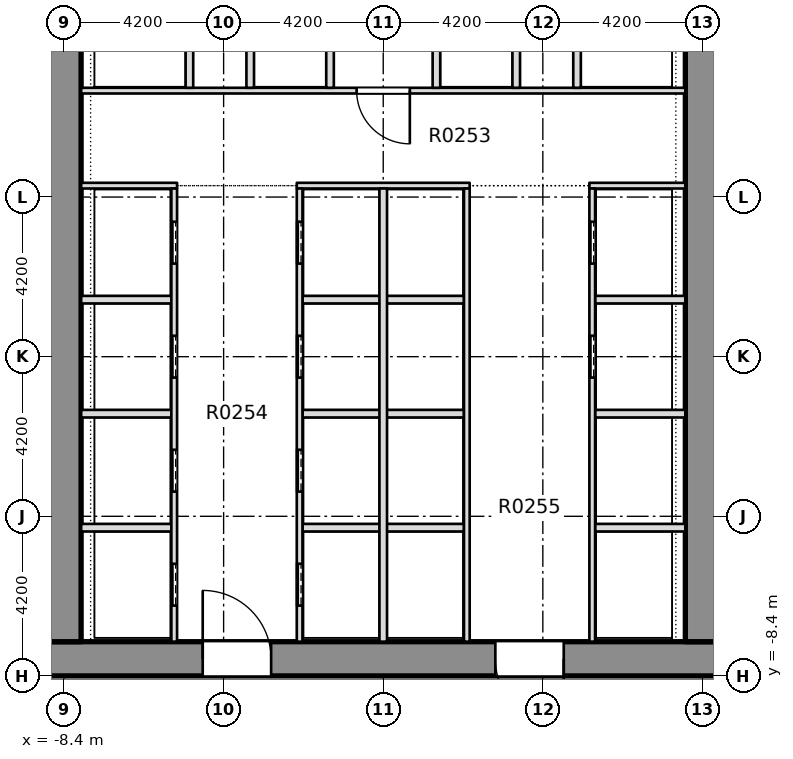
"""IFC4 building model, lengths in metres.
Left out: names, types, materials, properties, quantities, classifications, styles, units other than length and angle.
Written with IfcOpenShell. Run it as: python <this file> out.ifc"""

import sys

from ifc_helpers import new_model, si_unit, direction, frame, frame_2d, origin, place, context, subcontext, project, spatial, rectangle, extrude, element, fill, save


model = new_model("IFC4")
c1 = context("Model", 3, precision=1e-05, world=origin(), true_north=direction((0.0, 1.0)))
c2 = subcontext(c1, "Body", "Model", "MODEL_VIEW")
j1 = project(units=[si_unit("LENGTHUNIT", "METRE"), si_unit("PLANEANGLEUNIT", "RADIAN")], contexts=[c1])
p1 = place(None, origin())
s1 = spatial("IfcSite", under=j1, at=p1, CompositionType="ELEMENT")
p2 = place(p1, origin())
s2 = spatial("IfcBuilding", under=s1, at=p2, CompositionType="ELEMENT")
p3 = place(p2, frame((0.0, 0.0, 12.5)))
s3 = spatial("IfcBuildingStorey", under=s2, at=p3, CompositionType="ELEMENT", Elevation=12.5)
p4 = place(p3, frame((-11.7, -7.95, -0.4), z_axis=(0.0, 0.0, 1.0), x_axis=(1.0, 0.0, 0.0)))
e1 = element("IfcWall", 1, at=p4, inside=s3, PredefinedType="SHEAR", context=c2, shape_type="SweptSolid", body=[
    extrude(rectangle(XDim=23.4, YDim=0.9, at=frame_2d((11.7, 0.0))), origin(), (0.0, 0.0, 1.0), 7.5),
])
p5 = place(p4, frame((6.95, 0.0, 0.4)))
e2 = element("IfcOpeningElement", 2, at=p5, cuts=e1, PredefinedType="OPENING", context=c2, shape_type="SweptSolid", body=[
    extrude(rectangle(XDim=1.8, YDim=2.1, at=frame_2d((0.9, 1.05))), frame((0.0, 0.46, 0.0), z_axis=(0.0, -1.0, 0.0), x_axis=(1.0, 0.0, 0.0)), (0.0, 0.0, 1.0), 0.92),
])
p6 = place(p4, frame((14.65, 0.0, 0.4)))
e3 = element("IfcOpeningElement", 3, at=p6, cuts=e1, PredefinedType="OPENING", context=c2, shape_type="SweptSolid", body=[
    extrude(rectangle(XDim=1.8, YDim=2.1, at=frame_2d((0.9, 1.05))), frame((0.0, 0.46, 0.0), z_axis=(0.0, -1.0, 0.0), x_axis=(1.0, 0.0, 0.0)), (0.0, 0.0, 1.0), 0.92),
])
p7 = place(p3, frame((-8.4, -7.5, -0.4), z_axis=(0.0, 0.0, 1.0), x_axis=(0.0, 1.0, 0.0)))
e4 = element("IfcWall", 4, at=p7, inside=s3, PredefinedType="SHEAR", context=c2, shape_type="SweptSolid", body=[
    extrude(rectangle(XDim=28.35, YDim=0.9, at=frame_2d((14.175, 0.0))), origin(), (0.0, 0.0, 1.0), 7.5),
])
p8 = place(p7, frame((18.4, 0.0, 0.4)))
e5 = element("IfcOpeningElement", 5, at=p8, cuts=e4, PredefinedType="OPENING", context=c2, shape_type="SweptSolid", body=[
    extrude(rectangle(XDim=1.2, YDim=2.1, at=frame_2d((0.6, 1.05))), frame((0.0, 0.46, 0.0), z_axis=(0.0, -1.0, 0.0), x_axis=(1.0, 0.0, 0.0)), (0.0, 0.0, 1.0), 0.92),
])
p9 = place(p3, frame((8.4, -7.5, -0.4), z_axis=(0.0, 0.0, 1.0), x_axis=(0.0, 1.0, 0.0)))
e6 = element("IfcWall", 6, at=p9, inside=s3, PredefinedType="SHEAR", context=c2, shape_type="SweptSolid", body=[
    extrude(rectangle(XDim=28.35, YDim=0.9, at=frame_2d((14.175, 0.0))), origin(), (0.0, 0.0, 1.0), 7.5),
])
p10 = place(p9, frame((18.4, 0.0, 0.4)))
e7 = element("IfcOpeningElement", 7, at=p10, cuts=e6, PredefinedType="OPENING", context=c2, shape_type="SweptSolid", body=[
    extrude(rectangle(XDim=1.2, YDim=2.1, at=frame_2d((0.6, 1.05))), frame((0.0, 0.46, 0.0), z_axis=(0.0, -1.0, 0.0), x_axis=(1.0, 0.0, 0.0)), (0.0, 0.0, 1.0), 0.92),
])
p11 = place(p3, frame((-7.949, -4.5, 0.0), z_axis=(0.0, 0.0, 1.0), x_axis=(1.0, 0.0, 0.0)))
e8 = element("IfcWall", 8, at=p11, inside=s3, PredefinedType="PARTITIONING", context=c2, shape_type="SweptSolid", body=[
    extrude(rectangle(XDim=2.374, YDim=0.2, at=frame_2d((1.187, 0.0))), origin(), (0.0, 0.0, 1.0), 7.1),
])
p12 = place(p3, frame((-2.125, -4.5, 0.0), z_axis=(0.0, 0.0, 1.0), x_axis=(1.0, 0.0, 0.0)))
e9 = element("IfcWall", 9, at=p12, inside=s3, PredefinedType="PARTITIONING", context=c2, shape_type="SweptSolid", body=[
    extrude(rectangle(XDim=4.25, YDim=0.2, at=frame_2d((2.125, 0.0))), origin(), (0.0, 0.0, 1.0), 7.1),
])
for number, where, z_axis, x_axis in (
    (10, (5.575, -4.5, 0.0), (0.0, 0.0, 1.0), (1.0, 0.0, 0.0)),
    (11, (-7.949, -1.5, 0.0), (0.0, 0.0, 1.0), (1.0, 0.0, 0.0)),
):
    element("IfcWall", number, at=place(p3, frame(where, z_axis=z_axis, x_axis=x_axis)), inside=s3, PredefinedType="PARTITIONING", context=c2, shape_type="SweptSolid", body=[
        extrude(rectangle(XDim=2.374, YDim=0.2, at=frame_2d((1.187, 0.0))), origin(), (0.0, 0.0, 1.0), 7.1),
    ])
p13 = place(p3, frame((-2.125, -1.5, 0.0), z_axis=(0.0, 0.0, 1.0), x_axis=(1.0, 0.0, 0.0)))
e12 = element("IfcWall", 12, at=p13, inside=s3, PredefinedType="PARTITIONING", context=c2, shape_type="SweptSolid", body=[
    extrude(rectangle(XDim=4.25, YDim=0.2, at=frame_2d((2.125, 0.0))), origin(), (0.0, 0.0, 1.0), 7.1),
])
for number, where, z_axis, x_axis in (
    (13, (5.575, -1.5, 0.0), (0.0, 0.0, 1.0), (1.0, 0.0, 0.0)),
    (14, (-7.949, 1.5, 0.0), (0.0, 0.0, 1.0), (1.0, 0.0, 0.0)),
):
    element("IfcWall", number, at=place(p3, frame(where, z_axis=z_axis, x_axis=x_axis)), inside=s3, PredefinedType="PARTITIONING", context=c2, shape_type="SweptSolid", body=[
        extrude(rectangle(XDim=2.374, YDim=0.2, at=frame_2d((1.187, 0.0))), origin(), (0.0, 0.0, 1.0), 7.1),
    ])
p14 = place(p3, frame((-2.125, 1.5, 0.0), z_axis=(0.0, 0.0, 1.0), x_axis=(1.0, 0.0, 0.0)))
e15 = element("IfcWall", 15, at=p14, inside=s3, PredefinedType="PARTITIONING", context=c2, shape_type="SweptSolid", body=[
    extrude(rectangle(XDim=4.25, YDim=0.2, at=frame_2d((2.125, 0.0))), origin(), (0.0, 0.0, 1.0), 7.1),
])
p15 = place(p3, frame((5.575, 1.5, 0.0), z_axis=(0.0, 0.0, 1.0), x_axis=(1.0, 0.0, 0.0)))
e16 = element("IfcWall", 16, at=p15, inside=s3, PredefinedType="PARTITIONING", context=c2, shape_type="SweptSolid", body=[
    extrude(rectangle(XDim=2.374, YDim=0.2, at=frame_2d((1.187, 0.0))), origin(), (0.0, 0.0, 1.0), 7.1),
])
p16 = place(p3, frame((-7.949, 4.5, 0.0), z_axis=(0.0, 0.0, 1.0), x_axis=(1.0, 0.0, 0.0)))
e17 = element("IfcWall", 17, at=p16, inside=s3, PredefinedType="PARTITIONING", context=c2, shape_type="SweptSolid", body=[
    extrude(rectangle(XDim=2.524, YDim=0.15, at=frame_2d((1.262, 0.0))), origin(), (0.0, 0.0, 1.0), 7.1),
])
p17 = place(p3, frame((-2.275, 4.5, 0.0), z_axis=(0.0, 0.0, 1.0), x_axis=(1.0, 0.0, 0.0)))
e18 = element("IfcWall", 18, at=p17, inside=s3, PredefinedType="PARTITIONING", context=c2, shape_type="SweptSolid", body=[
    extrude(rectangle(XDim=4.55, YDim=0.15, at=frame_2d((2.275, 0.0))), origin(), (0.0, 0.0, 1.0), 7.1),
])
p18 = place(p3, frame((5.425, 4.5, 0.0), z_axis=(0.0, 0.0, 1.0), x_axis=(1.0, 0.0, 0.0)))
e19 = element("IfcWall", 19, at=p18, inside=s3, PredefinedType="PARTITIONING", context=c2, shape_type="SweptSolid", body=[
    extrude(rectangle(XDim=2.524, YDim=0.15, at=frame_2d((1.262, 0.0))), origin(), (0.0, 0.0, 1.0), 7.1),
])
p19 = place(p3, frame((-7.949, 7.0, 0.0), z_axis=(0.0, 0.0, 1.0), x_axis=(1.0, 0.0, 0.0)))
e20 = element("IfcWall", 20, at=p19, inside=s3, PredefinedType="PARTITIONING", context=c2, shape_type="SweptSolid", body=[
    extrude(rectangle(XDim=15.898, YDim=0.15, at=frame_2d((7.949, 0.0))), origin(), (0.0, 0.0, 1.0), 7.1),
])
p20 = place(p19, frame((7.249, 0.0, 0.0)))
e21 = element("IfcOpeningElement", 21, at=p20, cuts=e20, PredefinedType="OPENING", context=c2, shape_type="SweptSolid", body=[
    extrude(rectangle(XDim=1.4, YDim=2.1, at=frame_2d((0.7, 1.05))), frame((0.0, 0.085, 0.0), z_axis=(0.0, -1.0, 0.0), x_axis=(1.0, 0.0, 0.0)), (0.0, 0.0, 1.0), 0.17),
])
p21 = place(p3, frame((-5.5, -7.499, 0.0), z_axis=(0.0, 0.0, 1.0), x_axis=(0.0, 1.0, 0.0)))
e22 = element("IfcWall", 22, at=p21, inside=s3, PredefinedType="PARTITIONING", context=c2, shape_type="SweptSolid", body=[
    extrude(rectangle(XDim=11.924, YDim=0.15, at=frame_2d((5.962, 0.0))), origin(), (0.0, 0.0, 1.0), 7.1),
])
p22 = place(p21, frame((0.949, 0.0, 0.0)))
e23 = element("IfcOpeningElement", 23, at=p22, cuts=e22, PredefinedType="OPENING", context=c2, shape_type="SweptSolid", body=[
    extrude(rectangle(XDim=1.1, YDim=2.1, at=frame_2d((0.55, 1.05))), frame((0.0, 0.085, 0.0), z_axis=(0.0, -1.0, 0.0), x_axis=(1.0, 0.0, 0.0)), (0.0, 0.0, 1.0), 0.17),
])
p23 = place(p21, frame((3.949, 0.0, 0.0)))
e24 = element("IfcOpeningElement", 24, at=p23, cuts=e22, PredefinedType="OPENING", context=c2, shape_type="SweptSolid", body=[
    extrude(rectangle(XDim=1.1, YDim=2.1, at=frame_2d((0.55, 1.05))), frame((0.0, 0.085, 0.0), z_axis=(0.0, -1.0, 0.0), x_axis=(1.0, 0.0, 0.0)), (0.0, 0.0, 1.0), 0.17),
])
p24 = place(p21, frame((6.949, 0.0, 0.0)))
e25 = element("IfcOpeningElement", 25, at=p24, cuts=e22, PredefinedType="OPENING", context=c2, shape_type="SweptSolid", body=[
    extrude(rectangle(XDim=1.1, YDim=2.1, at=frame_2d((0.55, 1.05))), frame((0.0, 0.085, 0.0), z_axis=(0.0, -1.0, 0.0), x_axis=(1.0, 0.0, 0.0)), (0.0, 0.0, 1.0), 0.17),
])
p25 = place(p21, frame((9.949, 0.0, 0.0)))
e26 = element("IfcOpeningElement", 26, at=p25, cuts=e22, PredefinedType="OPENING", context=c2, shape_type="SweptSolid", body=[
    extrude(rectangle(XDim=1.1, YDim=2.1, at=frame_2d((0.55, 1.05))), frame((0.0, 0.085, 0.0), z_axis=(0.0, -1.0, 0.0), x_axis=(1.0, 0.0, 0.0)), (0.0, 0.0, 1.0), 0.17),
])
p26 = place(p3, frame((-5.1, 7.075, 0.0), z_axis=(0.0, 0.0, 1.0), x_axis=(0.0, 1.0, 0.0)))
e27 = element("IfcWall", 27, at=p26, inside=s3, PredefinedType="PARTITIONING", context=c2, shape_type="SweptSolid", body=[
    extrude(rectangle(XDim=2.725, YDim=0.2, at=frame_2d((1.363, 0.0))), origin(), (0.0, 0.0, 1.0), 7.1),
])
p27 = place(p3, frame((-3.5, 7.075, 0.0), z_axis=(0.0, 0.0, 1.0), x_axis=(0.0, 1.0, 0.0)))
e28 = element("IfcWall", 28, at=p27, inside=s3, PredefinedType="PARTITIONING", context=c2, shape_type="SweptSolid", body=[
    extrude(rectangle(XDim=2.85, YDim=0.2, at=frame_2d((1.425, 0.0))), origin(), (0.0, 0.0, 1.0), 7.1),
])
p28 = place(p3, frame((-2.2, -7.499, 0.0), z_axis=(0.0, 0.0, 1.0), x_axis=(0.0, 1.0, 0.0)))
e29 = element("IfcWall", 29, at=p28, inside=s3, PredefinedType="PARTITIONING", context=c2, shape_type="SweptSolid", body=[
    extrude(rectangle(XDim=11.924, YDim=0.15, at=frame_2d((5.962, 0.0))), origin(), (0.0, 0.0, 1.0), 7.1),
])
p29 = place(p28, frame((0.949, 0.0, 0.0)))
e30 = element("IfcOpeningElement", 30, at=p29, cuts=e29, PredefinedType="OPENING", context=c2, shape_type="SweptSolid", body=[
    extrude(rectangle(XDim=1.1, YDim=2.1, at=frame_2d((0.55, 1.05))), frame((0.0, 0.085, 0.0), z_axis=(0.0, -1.0, 0.0), x_axis=(1.0, 0.0, 0.0)), (0.0, 0.0, 1.0), 0.17),
])
p30 = place(p28, frame((3.949, 0.0, 0.0)))
e31 = element("IfcOpeningElement", 31, at=p30, cuts=e29, PredefinedType="OPENING", context=c2, shape_type="SweptSolid", body=[
    extrude(rectangle(XDim=1.1, YDim=2.1, at=frame_2d((0.55, 1.05))), frame((0.0, 0.085, 0.0), z_axis=(0.0, -1.0, 0.0), x_axis=(1.0, 0.0, 0.0)), (0.0, 0.0, 1.0), 0.17),
])
p31 = place(p28, frame((6.949, 0.0, 0.0)))
e32 = element("IfcOpeningElement", 32, at=p31, cuts=e29, PredefinedType="OPENING", context=c2, shape_type="SweptSolid", body=[
    extrude(rectangle(XDim=1.1, YDim=2.1, at=frame_2d((0.55, 1.05))), frame((0.0, 0.085, 0.0), z_axis=(0.0, -1.0, 0.0), x_axis=(1.0, 0.0, 0.0)), (0.0, 0.0, 1.0), 0.17),
])
p32 = place(p28, frame((9.949, 0.0, 0.0)))
e33 = element("IfcOpeningElement", 33, at=p32, cuts=e29, PredefinedType="OPENING", context=c2, shape_type="SweptSolid", body=[
    extrude(rectangle(XDim=1.1, YDim=2.1, at=frame_2d((0.55, 1.05))), frame((0.0, 0.085, 0.0), z_axis=(0.0, -1.0, 0.0), x_axis=(1.0, 0.0, 0.0)), (0.0, 0.0, 1.0), 0.17),
])
p33 = place(p3, frame((-1.4, 7.075, 0.0), z_axis=(0.0, 0.0, 1.0), x_axis=(0.0, 1.0, 0.0)))
e34 = element("IfcWall", 34, at=p33, inside=s3, PredefinedType="PARTITIONING", context=c2, shape_type="SweptSolid", body=[
    extrude(rectangle(XDim=2.85, YDim=0.2, at=frame_2d((1.425, 0.0))), origin(), (0.0, 0.0, 1.0), 7.1),
])
p34 = place(p3, frame((0.0, -7.499, 0.0), z_axis=(0.0, 0.0, 1.0), x_axis=(0.0, 1.0, 0.0)))
e35 = element("IfcWall", 35, at=p34, inside=s3, PredefinedType="PARTITIONING", context=c2, shape_type="SweptSolid", body=[
    extrude(rectangle(XDim=11.924, YDim=0.2, at=frame_2d((5.962, 0.0))), origin(), (0.0, 0.0, 1.0), 7.1),
])
p35 = place(p3, frame((1.4, 7.075, 0.0), z_axis=(0.0, 0.0, 1.0), x_axis=(0.0, 1.0, 0.0)))
e36 = element("IfcWall", 36, at=p35, inside=s3, PredefinedType="PARTITIONING", context=c2, shape_type="SweptSolid", body=[
    extrude(rectangle(XDim=2.85, YDim=0.2, at=frame_2d((1.425, 0.0))), origin(), (0.0, 0.0, 1.0), 7.1),
])
p36 = place(p3, frame((2.2, -7.499, 0.0), z_axis=(0.0, 0.0, 1.0), x_axis=(0.0, 1.0, 0.0)))
e37 = element("IfcWall", 37, at=p36, inside=s3, PredefinedType="PARTITIONING", context=c2, shape_type="SweptSolid", body=[
    extrude(rectangle(XDim=11.924, YDim=0.15, at=frame_2d((5.962, 0.0))), origin(), (0.0, 0.0, 1.0), 7.1),
])
p37 = place(p3, frame((3.5, 7.075, 0.0), z_axis=(0.0, 0.0, 1.0), x_axis=(0.0, 1.0, 0.0)))
e38 = element("IfcWall", 38, at=p37, inside=s3, PredefinedType="PARTITIONING", context=c2, shape_type="SweptSolid", body=[
    extrude(rectangle(XDim=2.85, YDim=0.2, at=frame_2d((1.425, 0.0))), origin(), (0.0, 0.0, 1.0), 7.1),
])
p38 = place(p3, frame((5.1, 7.075, 0.0), z_axis=(0.0, 0.0, 1.0), x_axis=(0.0, 1.0, 0.0)))
e39 = element("IfcWall", 39, at=p38, inside=s3, PredefinedType="PARTITIONING", context=c2, shape_type="SweptSolid", body=[
    extrude(rectangle(XDim=2.725, YDim=0.2, at=frame_2d((1.363, 0.0))), origin(), (0.0, 0.0, 1.0), 7.1),
])
p39 = place(p3, frame((5.5, -7.499, 0.0), z_axis=(0.0, 0.0, 1.0), x_axis=(0.0, 1.0, 0.0)))
e40 = element("IfcWall", 40, at=p39, inside=s3, PredefinedType="PARTITIONING", context=c2, shape_type="SweptSolid", body=[
    extrude(rectangle(XDim=11.924, YDim=0.15, at=frame_2d((5.962, 0.0))), origin(), (0.0, 0.0, 1.0), 7.1),
])
p40 = place(p39, frame((6.949, 0.0, 0.0)))
e41 = element("IfcOpeningElement", 41, at=p40, cuts=e40, PredefinedType="OPENING", context=c2, shape_type="SweptSolid", body=[
    extrude(rectangle(XDim=1.1, YDim=2.1, at=frame_2d((0.55, 1.05))), frame((0.0, 0.085, 0.0), z_axis=(0.0, -1.0, 0.0), x_axis=(1.0, 0.0, 0.0)), (0.0, 0.0, 1.0), 0.17),
])
p41 = place(p39, frame((9.949, 0.0, 0.0)))
e42 = element("IfcOpeningElement", 42, at=p41, cuts=e40, PredefinedType="OPENING", context=c2, shape_type="SweptSolid", body=[
    extrude(rectangle(XDim=1.1, YDim=2.1, at=frame_2d((0.55, 1.05))), frame((0.0, 0.085, 0.0), z_axis=(0.0, -1.0, 0.0), x_axis=(1.0, 0.0, 0.0)), (0.0, 0.0, 1.0), 0.17),
])
p42 = place(p22, origin())
e43 = element("IfcDoor", 43, at=p42, inside=s3, OperationType="SLIDING_TO_RIGHT", PredefinedType="DOOR", context=c2, shape_type="SweptSolid", body=[
    extrude(rectangle(XDim=1.1, YDim=2.1, at=frame_2d((0.55, 1.05))), frame((0.0, 0.025, 0.0), z_axis=(0.0, -1.0, 0.0), x_axis=(1.0, 0.0, 0.0)), (0.0, 0.0, 1.0), 0.05),
])
fill(e23, e43)
p43 = place(p23, origin())
e44 = element("IfcDoor", 44, at=p43, inside=s3, OperationType="SLIDING_TO_RIGHT", PredefinedType="DOOR", context=c2, shape_type="SweptSolid", body=[
    extrude(rectangle(XDim=1.1, YDim=2.1, at=frame_2d((0.55, 1.05))), frame((0.0, 0.025, 0.0), z_axis=(0.0, -1.0, 0.0), x_axis=(1.0, 0.0, 0.0)), (0.0, 0.0, 1.0), 0.05),
])
fill(e24, e44)
p44 = place(p24, origin())
e45 = element("IfcDoor", 45, at=p44, inside=s3, OperationType="SLIDING_TO_RIGHT", PredefinedType="DOOR", context=c2, shape_type="SweptSolid", body=[
    extrude(rectangle(XDim=1.1, YDim=2.1, at=frame_2d((0.55, 1.05))), frame((0.0, 0.025, 0.0), z_axis=(0.0, -1.0, 0.0), x_axis=(1.0, 0.0, 0.0)), (0.0, 0.0, 1.0), 0.05),
])
fill(e25, e45)
p45 = place(p25, origin())
e46 = element("IfcDoor", 46, at=p45, inside=s3, OperationType="SLIDING_TO_RIGHT", PredefinedType="DOOR", context=c2, shape_type="SweptSolid", body=[
    extrude(rectangle(XDim=1.1, YDim=2.1, at=frame_2d((0.55, 1.05))), frame((0.0, 0.025, 0.0), z_axis=(0.0, -1.0, 0.0), x_axis=(1.0, 0.0, 0.0)), (0.0, 0.0, 1.0), 0.05),
])
fill(e26, e46)
p46 = place(p29, origin())
e47 = element("IfcDoor", 47, at=p46, inside=s3, OperationType="SLIDING_TO_RIGHT", PredefinedType="DOOR", context=c2, shape_type="SweptSolid", body=[
    extrude(rectangle(XDim=1.1, YDim=2.1, at=frame_2d((0.55, 1.05))), frame((0.0, 0.025, 0.0), z_axis=(0.0, -1.0, 0.0), x_axis=(1.0, 0.0, 0.0)), (0.0, 0.0, 1.0), 0.05),
])
fill(e30, e47)
p47 = place(p30, origin())
e48 = element("IfcDoor", 48, at=p47, inside=s3, OperationType="SLIDING_TO_RIGHT", PredefinedType="DOOR", context=c2, shape_type="SweptSolid", body=[
    extrude(rectangle(XDim=1.1, YDim=2.1, at=frame_2d((0.55, 1.05))), frame((0.0, 0.025, 0.0), z_axis=(0.0, -1.0, 0.0), x_axis=(1.0, 0.0, 0.0)), (0.0, 0.0, 1.0), 0.05),
])
fill(e31, e48)
p48 = place(p31, origin())
e49 = element("IfcDoor", 49, at=p48, inside=s3, OperationType="SLIDING_TO_RIGHT", PredefinedType="DOOR", context=c2, shape_type="SweptSolid", body=[
    extrude(rectangle(XDim=1.1, YDim=2.1, at=frame_2d((0.55, 1.05))), frame((0.0, 0.025, 0.0), z_axis=(0.0, -1.0, 0.0), x_axis=(1.0, 0.0, 0.0)), (0.0, 0.0, 1.0), 0.05),
])
fill(e32, e49)
p49 = place(p32, origin())
e50 = element("IfcDoor", 50, at=p49, inside=s3, OperationType="SLIDING_TO_RIGHT", PredefinedType="DOOR", context=c2, shape_type="SweptSolid", body=[
    extrude(rectangle(XDim=1.1, YDim=2.1, at=frame_2d((0.55, 1.05))), frame((0.0, 0.025, 0.0), z_axis=(0.0, -1.0, 0.0), x_axis=(1.0, 0.0, 0.0)), (0.0, 0.0, 1.0), 0.05),
])
fill(e33, e50)
p50 = place(p40, origin())
e51 = element("IfcDoor", 51, at=p50, inside=s3, OperationType="SLIDING_TO_RIGHT", PredefinedType="DOOR", context=c2, shape_type="SweptSolid", body=[
    extrude(rectangle(XDim=1.1, YDim=2.1, at=frame_2d((0.55, 1.05))), frame((0.0, 0.025, 0.0), z_axis=(0.0, -1.0, 0.0), x_axis=(1.0, 0.0, 0.0)), (0.0, 0.0, 1.0), 0.05),
])
fill(e41, e51)
p51 = place(p41, origin())
e52 = element("IfcDoor", 52, at=p51, inside=s3, OperationType="SLIDING_TO_RIGHT", PredefinedType="DOOR", context=c2, shape_type="SweptSolid", body=[
    extrude(rectangle(XDim=1.1, YDim=2.1, at=frame_2d((0.55, 1.05))), frame((0.0, 0.025, 0.0), z_axis=(0.0, -1.0, 0.0), x_axis=(1.0, 0.0, 0.0)), (0.0, 0.0, 1.0), 0.05),
])
fill(e42, e52)
p52 = place(p20, origin())
e53 = element("IfcDoor", 53, at=p52, inside=s3, OperationType="SINGLE_SWING_RIGHT", PredefinedType="DOOR", context=c2, shape_type="SweptSolid", body=[
    extrude(rectangle(XDim=1.4, YDim=2.1, at=frame_2d((0.7, 1.05))), frame((0.0, 0.025, 0.0), z_axis=(0.0, -1.0, 0.0), x_axis=(1.0, 0.0, 0.0)), (0.0, 0.0, 1.0), 0.05),
])
fill(e21, e53)
p53 = place(p5, origin())
e54 = element("IfcDoor", 54, at=p53, inside=s3, OperationType="SINGLE_SWING_LEFT", PredefinedType="DOOR", context=c2, shape_type="SweptSolid", body=[
    extrude(rectangle(XDim=1.8, YDim=2.1, at=frame_2d((0.9, 1.05))), frame((0.0, 0.025, 0.0), z_axis=(0.0, -1.0, 0.0), x_axis=(1.0, 0.0, 0.0)), (0.0, 0.0, 1.0), 0.05),
])
fill(e2, e54)
p54 = place(p6, origin())
e55 = element("IfcDoor", 55, at=p54, inside=s3, OperationType="SINGLE_SWING_LEFT", PredefinedType="DOOR", context=c2, shape_type="SweptSolid", body=[
    extrude(rectangle(XDim=1.8, YDim=2.1, at=frame_2d((0.9, 1.05))), frame((0.0, 0.025, 0.0), z_axis=(0.0, -1.0, 0.0), x_axis=(1.0, 0.0, 0.0)), (0.0, 0.0, 1.0), 0.05),
])
fill(e3, e55)
save(model, sys.argv[1])
